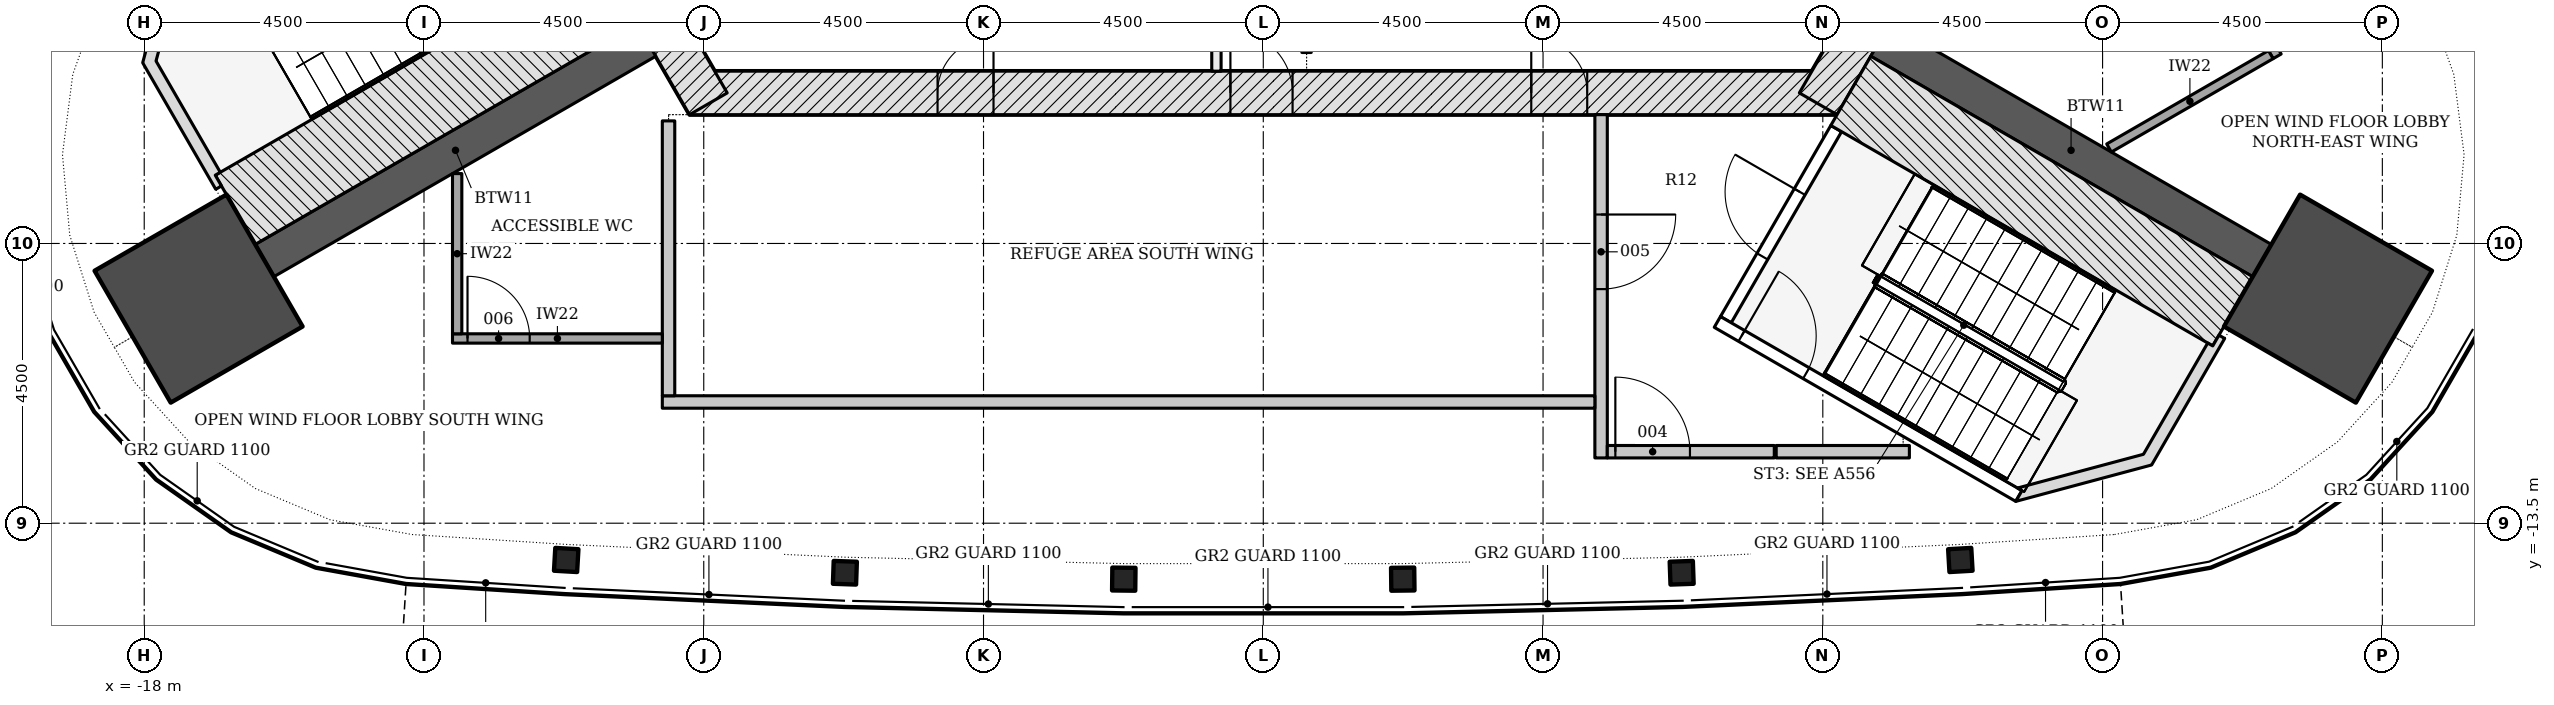
"""IFC4 building model, lengths in metres.
Left out: names, types, materials, properties, quantities, classifications, styles, units other than length and angle.
Written with IfcOpenShell. Run it as: python <this file> out.ifc"""

import sys

from ifc_helpers import new_model, si_unit, direction, frame, frame_2d, origin, origin_2d, place, context, subcontext, project, spatial, polyline, rectangle, i_section, outline, extrude, element, fill, save


model = new_model("IFC4")
c1 = context("Model", 3, precision=1e-05, world=origin(), true_north=direction((0.0, 1.0)))
c2 = subcontext(c1, "Body", "Model", "MODEL_VIEW")
j1 = project(units=[si_unit("LENGTHUNIT", "METRE"), si_unit("PLANEANGLEUNIT", "RADIAN")], contexts=[c1])
p1 = place(None, origin())
s1 = spatial("IfcSite", under=j1, at=p1, CompositionType="ELEMENT")
p2 = place(p1, origin())
s2 = spatial("IfcBuilding", under=s1, at=p2, CompositionType="ELEMENT")
p3 = place(p2, frame((0.0, 0.0, 250.8)))
s3 = spatial("IfcBuildingStorey", under=s2, at=p3, CompositionType="ELEMENT", Elevation=250.8)
p4 = place(p3, frame((-9.229, -6.578, -0.3), z_axis=(0.0, 0.0, 1.0), x_axis=(1.0, 0.0, 0.0)))
e1 = element("IfcWall", 1, at=p4, inside=s3, PredefinedType="SHEAR", context=c2, shape_type="SweptSolid", body=[
    extrude(rectangle(XDim=18.458, YDim=0.7, at=frame_2d((9.229, 0.0))), origin(), (0.0, 0.0, 1.0), 7.2),
])
p5 = place(p4, frame((8.7, 0.0, 0.3)))
e2 = element("IfcOpeningElement", 2, at=p5, cuts=e1, PredefinedType="OPENING", context=c2, shape_type="SweptSolid", body=[
    extrude(rectangle(XDim=1.0, YDim=2.1, at=frame_2d((0.5, 1.05))), frame((0.0, 0.36, 0.0), z_axis=(0.0, -1.0, 0.0), x_axis=(1.0, 0.0, 0.0)), (0.0, 0.0, 1.0), 0.72),
])
p6 = place(p4, frame((3.99, 0.0, 0.3)))
e3 = element("IfcOpeningElement", 3, at=p6, cuts=e1, PredefinedType="OPENING", context=c2, shape_type="SweptSolid", body=[
    extrude(rectangle(XDim=0.9, YDim=2.1, at=frame_2d((0.45, 1.05))), frame((0.0, 0.36, 0.0), z_axis=(0.0, -1.0, 0.0), x_axis=(1.0, 0.0, 0.0)), (0.0, 0.0, 1.0), 0.72),
])
p7 = place(p4, frame((13.539, 0.0, 0.3)))
e4 = element("IfcOpeningElement", 4, at=p7, cuts=e1, PredefinedType="OPENING", context=c2, shape_type="SweptSolid", body=[
    extrude(rectangle(XDim=0.9, YDim=2.1, at=frame_2d((0.45, 1.05))), frame((0.0, 0.36, 0.0), z_axis=(0.0, -1.0, 0.0), x_axis=(1.0, 0.0, 0.0)), (0.0, 0.0, 1.0), 0.72),
])
for number, where, z_axis, x_axis in (
    (5, (8.926, -6.753, -0.3), (0.0, 0.0, 1.0), (0.5, 0.866, 0.0)),
    (6, (-10.311, -4.353, -0.3), (0.0, 0.0, 1.0), (0.5, -0.866, 0.0)),
):
    element("IfcWall", number, at=place(p3, frame(where, z_axis=z_axis, x_axis=x_axis)), inside=s3, PredefinedType="SHEAR", context=c2, shape_type="SweptSolid", body=[
        extrude(rectangle(XDim=2.771, YDim=0.7, at=frame_2d((1.386, 0.0))), origin(), (0.0, 0.0, 1.0), 7.2),
    ])
for number, where, z_axis, x_axis in (
    (7, (-9.922, -5.728, -0.3), (0.0, 0.0, 1.0), (-0.866, -0.5, 0.0)),
    (8, (9.922, -5.728, -0.3), (0.0, 0.0, 1.0), (0.866, -0.5, 0.0)),
):
    element("IfcWall", number, at=place(p3, frame(where, z_axis=z_axis, x_axis=x_axis)), inside=s3, PredefinedType="SHEAR", context=c2, shape_type="SweptSolid", body=[
        extrude(rectangle(XDim=7.093, YDim=0.6, at=frame_2d((3.547, 0.0))), origin(), (0.0, 0.0, 1.0), 7.2),
    ])
for number, where, z_axis, x_axis in (
    (9, (-17.126, -9.887, -0.3), (0.0, 0.0, 1.0), (-0.866, -0.5, 0.0)),
    (10, (17.126, -9.887, -0.3), (0.0, 0.0, 1.0), (0.866, -0.5, 0.0)),
):
    element("IfcColumn", number, at=place(p3, frame(where, z_axis=z_axis, x_axis=x_axis)), inside=s3, PredefinedType="COLUMN", context=c2, shape_type="SweptSolid", body=[
        extrude(rectangle(XDim=2.45, YDim=2.45, at=origin_2d()), origin(), (0.0, 0.0, 1.0), 7.2),
    ])
for number, where, z_axis, x_axis in (
    (11, (-11.212, -14.092, -0.3), (0.0, 0.0, 1.0), (0.998, -0.057, 0.0)),
    (12, (-6.73, -14.297, -0.3), (0.0, 0.0, 1.0), (0.999, -0.034, 0.0)),
    (13, (-2.244, -14.4, -0.3), (0.0, 0.0, 1.0), (1.0, -0.011, 0.0)),
    (14, (2.244, -14.4, -0.3), (0.0, 0.0, 1.0), (1.0, 0.011, 0.0)),
    (15, (6.73, -14.297, -0.3), (0.0, 0.0, 1.0), (0.999, 0.034, 0.0)),
    (16, (11.212, -14.092, -0.3), (0.0, 0.0, 1.0), (0.998, 0.057, 0.0)),
):
    element("IfcColumn", number, at=place(p3, frame(where, z_axis=z_axis, x_axis=x_axis)), inside=s3, PredefinedType="COLUMN", context=c2, shape_type="SweptSolid", body=[
        extrude(i_section(OverallWidth=0.373, OverallDepth=0.368, WebThickness=0.015, FlangeThickness=0.024, FilletRadius=0.015, at=origin_2d()), origin(), (0.0, 0.0, 1.0), 7.2),
    ])
p8 = place(p3, frame((-0.754, 5.272, 0.0), z_axis=(0.0, 0.0, 1.0), x_axis=(0.0, -1.0, 0.0)))
e17 = element("IfcWall", 17, at=p8, inside=s3, PredefinedType="PARTITIONING", context=c2, shape_type="SweptSolid", body=[
    extrude(rectangle(XDim=11.5, YDim=0.15, at=frame_2d((5.75, 0.0))), origin(), (0.0, 0.0, 1.0), 6.9),
])
p9 = place(p8, frame((3.701, 0.0, 0.0)))
e18 = element("IfcOpeningElement", 18, at=p9, cuts=e17, PredefinedType="OPENING", context=c2, shape_type="SweptSolid", body=[
    extrude(rectangle(XDim=0.9, YDim=2.1, at=frame_2d((0.45, 1.05))), frame((0.0, 0.085, 0.0), z_axis=(0.0, -1.0, 0.0), x_axis=(1.0, 0.0, 0.0)), (0.0, 0.0, 1.0), 0.17),
])
p10 = place(p3, frame((0.696, -5.928, 0.0), z_axis=(0.0, 0.0, 1.0), x_axis=(0.0, 1.0, 0.0)))
e19 = element("IfcWall", 19, at=p10, inside=s3, PredefinedType="PARTITIONING", context=c2, shape_type="SweptSolid", body=[
    extrude(rectangle(XDim=11.549, YDim=0.15, at=frame_2d((5.774, 0.0))), origin(), (0.0, 0.0, 1.0), 6.9),
])
p11 = place(p10, frame((6.6, 0.0, 0.0)))
e20 = element("IfcOpeningElement", 20, at=p11, cuts=e19, PredefinedType="OPENING", context=c2, shape_type="SweptSolid", body=[
    extrude(rectangle(XDim=0.9, YDim=2.1, at=frame_2d((0.45, 1.05))), frame((0.0, 0.085, 0.0), z_axis=(0.0, -1.0, 0.0), x_axis=(1.0, 0.0, 0.0)), (0.0, 0.0, 1.0), 0.17),
])
p12 = place(p3, frame((-10.393, -4.912, -0.3), z_axis=(0.0, 0.0, 1.0), x_axis=(-0.866023389271, -0.500003489223, 0.0)))
e21 = element("IfcWall", 21, at=p12, inside=s3, PredefinedType="SHEAR", context=c2, shape_type="SweptSolid", body=[
    extrude(rectangle(XDim=7.094, YDim=1.286, at=frame_2d((3.547, 0.0))), origin(), (0.0, 0.0, 1.0), 7.2),
])
p13 = place(p3, frame((0.0, 0.0, -0.3)))
e22 = element("IfcWall", 22, at=p13, inside=s3, PredefinedType="SHEAR", context=c2, shape_type="SweptSolid", body=[
    extrude(outline(polyline([(-17.439, -3.907), (-18.025, -6.093), (-16.85, -8.128), (-16.758, -8.075), (-16.858, -7.902), (-16.858, -7.902), (-16.858, -7.902), (-16.858, -7.902), (-16.858, -7.902), (-16.858, -7.902), (-16.858, -7.902), (-16.858, -7.902), (-16.858, -7.902), (-16.858, -7.902), (-16.858, -7.902), (-16.858, -7.902), (-16.858, -7.902), (-16.858, -7.902), (-16.858, -7.902), (-16.858, -7.902), (-16.858, -7.902), (-16.777, -7.855), (-17.81, -6.065), (-17.267, -4.039), (-17.339, -4.081), (-17.339, -4.081), (-17.339, -4.081), (-17.339, -4.081), (-17.339, -4.081), (-17.339, -4.081), (-17.339, -4.081), (-17.339, -4.081), (-17.339, -4.081), (-17.339, -4.081), (-17.339, -4.081), (-17.339, -4.081), (-17.339, -4.081), (-17.339, -4.081), (-17.339, -4.081), (-17.339, -4.081), (-17.339, -4.081), (-17.439, -3.907)])), origin(), (0.0, 0.0, 1.0), 7.2),
])
p14 = place(p3, frame((7.44, -10.226, -0.3), z_axis=(0.0, 0.0, 1.0), x_axis=(0.500022077904, 0.866012656725, 0.0)))
e23 = element("IfcWall", 23, at=p14, inside=s3, PredefinedType="SHEAR", context=c2, shape_type="SweptSolid", body=[
    extrude(rectangle(XDim=3.55, YDim=0.2, at=frame_2d((1.775, 0.0))), origin(), (0.0, 0.0, 1.0), 7.2),
])
p15 = place(p14, frame((1.175, 0.0, 0.3)))
e24 = element("IfcOpeningElement", 24, at=p15, cuts=e23, PredefinedType="OPENING", context=c2, shape_type="SweptSolid", body=[
    extrude(rectangle(XDim=1.2, YDim=2.1, at=frame_2d((0.6, 1.05))), frame((0.0, 0.11, 0.0), z_axis=(0.0, -1.0, 0.0), x_axis=(1.0, 0.0, 0.0)), (0.0, 0.0, 1.0), 0.22),
])
p16 = place(p3, frame((7.304, -10.262, -0.3), z_axis=(0.0, 0.0, 1.0), x_axis=(0.866026594901, -0.49999793692, 0.0)))
e25 = element("IfcWall", 25, at=p16, inside=s3, PredefinedType="SHEAR", context=c2, shape_type="SweptSolid", body=[
    extrude(rectangle(XDim=5.6, YDim=0.2, at=frame_2d((2.8, 0.0))), origin(), (0.0, 0.0, 1.0), 7.2),
])
p17 = place(p16, frame((0.45, 0.0, 0.3)))
e26 = element("IfcOpeningElement", 26, at=p17, cuts=e25, PredefinedType="OPENING", context=c2, shape_type="SweptSolid", body=[
    extrude(rectangle(XDim=1.2, YDim=2.1, at=frame_2d((0.6, 1.05))), frame((0.0, 0.11, 0.0), z_axis=(0.0, -1.0, 0.0), x_axis=(1.0, 0.0, 0.0)), (0.0, 0.0, 1.0), 0.22),
])
p18 = place(p3, frame((9.45, -6.545, -0.3), z_axis=(0.0, 0.0, 1.0), x_axis=(0.866023389271, -0.500003489223, 0.0)))
e27 = element("IfcWall", 27, at=p18, inside=s3, PredefinedType="SHEAR", context=c2, shape_type="SweptSolid", body=[
    extrude(rectangle(XDim=7.094, YDim=1.286, at=frame_2d((3.547, 0.0))), origin(), (0.0, 0.0, 1.0), 7.2),
])
p19 = place(p3, frame((0.0, 0.0, -0.3)))
e28 = element("IfcWall", 28, at=p19, inside=s3, PredefinedType="SHEAR", context=c2, shape_type="SweptSolid", body=[
    extrude(outline(polyline([(12.104, -13.149), (14.289, -12.563), (15.464, -10.528), (15.372, -10.475), (15.272, -10.648), (15.272, -10.648), (15.272, -10.648), (15.272, -10.648), (15.272, -10.648), (15.272, -10.648), (15.272, -10.648), (15.272, -10.648), (15.272, -10.648), (15.272, -10.648), (15.272, -10.648), (15.272, -10.648), (15.272, -10.648), (15.272, -10.648), (15.272, -10.648), (15.272, -10.648), (15.272, -10.648), (15.191, -10.601), (14.157, -12.392), (12.132, -12.934), (12.204, -12.976), (12.204, -12.976), (12.204, -12.976), (12.204, -12.976), (12.204, -12.976), (12.204, -12.976), (12.204, -12.976), (12.204, -12.976), (12.204, -12.976), (12.204, -12.976), (12.204, -12.976), (12.204, -12.976), (12.204, -12.976), (12.204, -12.976), (12.204, -12.976), (12.204, -12.976), (12.204, -12.976), (12.104, -13.149)])), origin(), (0.0, 0.0, 1.0), 7.2),
])
p20 = place(p3, frame((5.434, -6.928, 0.0), z_axis=(0.0, 0.0, 1.0), x_axis=(0.0, -1.0, 0.0)))
e29 = element("IfcWall", 29, at=p20, inside=s3, PredefinedType="PARTITIONING", context=c2, shape_type="SweptSolid", body=[
    extrude(rectangle(XDim=5.522, YDim=0.2, at=frame_2d((2.761, 0.0))), origin(), (0.0, 0.0, 1.0), 6.9),
])
p21 = place(p20, frame((1.606, 0.0, 0.0)))
e30 = element("IfcOpeningElement", 30, at=p21, cuts=e29, PredefinedType="OPENING", context=c2, shape_type="SweptSolid", body=[
    extrude(rectangle(XDim=1.2, YDim=2.1, at=frame_2d((0.6, 1.05))), frame((0.0, 0.11, 0.0), z_axis=(0.0, -1.0, 0.0), x_axis=(1.0, 0.0, 0.0)), (0.0, 0.0, 1.0), 0.22),
])
p22 = place(p3, frame((-9.667, -11.55, 0.0), z_axis=(0.0, 0.0, 1.0), x_axis=(1.0, 0.0, 0.0)))
e31 = element("IfcWall", 31, at=p22, inside=s3, PredefinedType="PARTITIONING", context=c2, shape_type="SweptSolid", body=[
    extrude(rectangle(XDim=15.0, YDim=0.2, at=frame_2d((7.5, 0.0))), origin(), (0.0, 0.0, 1.0), 6.352),
])
p23 = place(p3, frame((5.534, -12.35, 0.0), z_axis=(0.0, 0.0, 1.0), x_axis=(1.0, 0.0, 0.0)))
e32 = element("IfcWall", 32, at=p23, inside=s3, PredefinedType="PARTITIONING", context=c2, shape_type="SweptSolid", body=[
    extrude(rectangle(XDim=2.686, YDim=0.2, at=frame_2d((1.343, 0.0))), origin(), (0.0, 0.0, 1.0), 6.352),
])
p24 = place(p23, frame((0.129, 0.0, 0.0)))
e33 = element("IfcOpeningElement", 33, at=p24, cuts=e32, PredefinedType="OPENING", context=c2, shape_type="SweptSolid", body=[
    extrude(rectangle(XDim=1.2, YDim=2.1, at=frame_2d((0.6, 1.05))), frame((0.0, 0.11, 0.0), z_axis=(0.0, -1.0, 0.0), x_axis=(1.0, 0.0, 0.0)), (0.0, 0.0, 1.0), 0.22),
])
p25 = place(p3, frame((8.25, -12.35, 0.0), z_axis=(0.0, 0.0, 1.0), x_axis=(1.0, 0.0, 0.0)))
e34 = element("IfcWall", 34, at=p25, inside=s3, PredefinedType="PARTITIONING", context=c2, shape_type="SweptSolid", body=[
    extrude(rectangle(XDim=2.143, YDim=0.2, at=frame_2d((1.071, 0.0))), origin(), (0.0, 0.0, 1.0), 6.9),
])
p26 = place(p3, frame((-9.566, -11.45, 0.0), z_axis=(0.0, 0.0, 1.0), x_axis=(0.0, 1.0, 0.0)))
e35 = element("IfcWall", 35, at=p26, inside=s3, PredefinedType="PARTITIONING", context=c2, shape_type="SweptSolid", body=[
    extrude(rectangle(XDim=4.422, YDim=0.2, at=frame_2d((2.211, 0.0))), origin(), (0.0, 0.0, 1.0), 6.9),
])
p27 = place(p3, frame((-13.042, -10.528, 0.0), z_axis=(0.0, 0.0, 1.0), x_axis=(1.0, 0.0, 0.0)))
e36 = element("IfcWall", 36, at=p27, inside=s3, PredefinedType="PARTITIONING", context=c2, shape_type="SweptSolid", body=[
    extrude(rectangle(XDim=3.375, YDim=0.15, at=frame_2d((1.688, 0.0))), origin(), (0.0, 0.0, 1.0), 6.352),
])
p28 = place(p27, frame((0.241, 0.0, 0.0)))
e37 = element("IfcOpeningElement", 37, at=p28, cuts=e36, PredefinedType="OPENING", context=c2, shape_type="SweptSolid", body=[
    extrude(rectangle(XDim=1.0, YDim=2.1, at=frame_2d((0.5, 1.05))), frame((0.0, 0.085, 0.0), z_axis=(0.0, -1.0, 0.0), x_axis=(1.0, 0.0, 0.0)), (0.0, 0.0, 1.0), 0.17),
])
p29 = place(p3, frame((13.72, -1.508, 0.0), z_axis=(0.0, 0.0, 1.0), x_axis=(0.500020560727, -0.866013532718, 0.0)))
e38 = element("IfcWall", 38, at=p29, inside=s3, PredefinedType="PARTITIONING", context=c2, shape_type="SweptSolid", body=[
    extrude(rectangle(XDim=5.175, YDim=0.15, at=frame_2d((2.587, 0.0))), origin(), (0.0, 0.0, 1.0), 6.352),
])
p30 = place(p29, frame((2.469, 0.0, 0.0)))
e39 = element("IfcOpeningElement", 39, at=p30, cuts=e38, PredefinedType="OPENING", context=c2, shape_type="SweptSolid", body=[
    extrude(rectangle(XDim=1.0, YDim=2.1, at=frame_2d((0.5, 1.05))), frame((0.0, 0.085, 0.0), z_axis=(0.0, -1.0, 0.0), x_axis=(1.0, 0.0, 0.0)), (0.0, 0.0, 1.0), 0.17),
])
p31 = place(p3, frame((-12.966, -7.876, 0.0), z_axis=(0.0, 0.0, 1.0), x_axis=(0.0, -1.0, 0.0)))
e40 = element("IfcWall", 40, at=p31, inside=s3, PredefinedType="PARTITIONING", context=c2, shape_type="SweptSolid", body=[
    extrude(rectangle(XDim=2.577, YDim=0.15, at=frame_2d((1.289, 0.0))), origin(), (0.0, 0.0, 1.0), 6.9),
])
p32 = place(p3, frame((13.604, -7.465, 0.0), z_axis=(0.0, 0.0, 1.0), x_axis=(0.865998815133, 0.500046050067, 0.0)))
e41 = element("IfcWall", 41, at=p32, inside=s3, PredefinedType="PARTITIONING", context=c2, shape_type="SweptSolid", body=[
    extrude(rectangle(XDim=3.004, YDim=0.15, at=frame_2d((1.502, 0.0))), origin(), (0.0, 0.0, 1.0), 6.9),
])
p33 = place(p5, origin())
e42 = element("IfcDoor", 42, at=p33, inside=s3, OperationType="SINGLE_SWING_LEFT", PredefinedType="DOOR", context=c2, shape_type="SweptSolid", body=[
    extrude(rectangle(XDim=1.0, YDim=2.1, at=frame_2d((0.5, 1.05))), frame((0.0, 0.075, 0.0), z_axis=(0.0, -1.0, 0.0), x_axis=(1.0, 0.0, 0.0)), (0.0, 0.0, 1.0), 0.15),
])
fill(e2, e42)
p34 = place(p6, origin())
e43 = element("IfcDoor", 43, at=p34, inside=s3, OperationType="SINGLE_SWING_RIGHT", PredefinedType="DOOR", context=c2, shape_type="SweptSolid", body=[
    extrude(rectangle(XDim=0.9, YDim=2.1, at=frame_2d((0.45, 1.05))), frame((0.0, 0.075, 0.0), z_axis=(0.0, -1.0, 0.0), x_axis=(1.0, 0.0, 0.0)), (0.0, 0.0, 1.0), 0.15),
])
fill(e3, e43)
p35 = place(p7, origin())
e44 = element("IfcDoor", 44, at=p35, inside=s3, OperationType="SINGLE_SWING_LEFT", PredefinedType="DOOR", context=c2, shape_type="SweptSolid", body=[
    extrude(rectangle(XDim=0.9, YDim=2.1, at=frame_2d((0.45, 1.05))), frame((0.0, 0.075, 0.0), z_axis=(0.0, -1.0, 0.0), x_axis=(1.0, 0.0, 0.0)), (0.0, 0.0, 1.0), 0.15),
])
fill(e4, e44)
p36 = place(p15, origin())
e45 = element("IfcDoor", 45, at=p36, inside=s3, OperationType="SINGLE_SWING_RIGHT", PredefinedType="DOOR", context=c2, shape_type="SweptSolid", body=[
    extrude(rectangle(XDim=1.2, YDim=2.1, at=frame_2d((0.6, 1.05))), frame((0.0, 0.025, 0.0), z_axis=(0.0, -1.0, 0.0), x_axis=(1.0, 0.0, 0.0)), (0.0, 0.0, 1.0), 0.05),
])
fill(e24, e45)
p37 = place(p17, origin())
e46 = element("IfcDoor", 46, at=p37, inside=s3, OperationType="SINGLE_SWING_LEFT", PredefinedType="DOOR", context=c2, shape_type="SweptSolid", body=[
    extrude(rectangle(XDim=1.2, YDim=2.1, at=frame_2d((0.6, 1.05))), frame((0.0, 0.025, 0.0), z_axis=(0.0, -1.0, 0.0), x_axis=(1.0, 0.0, 0.0)), (0.0, 0.0, 1.0), 0.05),
])
fill(e26, e46)
p38 = place(p24, origin())
e47 = element("IfcDoor", 47, at=p38, inside=s3, OperationType="SINGLE_SWING_LEFT", PredefinedType="DOOR", context=c2, shape_type="SweptSolid", body=[
    extrude(rectangle(XDim=1.2, YDim=2.1, at=frame_2d((0.6, 1.05))), frame((0.0, 0.025, 0.0), z_axis=(0.0, -1.0, 0.0), x_axis=(1.0, 0.0, 0.0)), (0.0, 0.0, 1.0), 0.05),
])
fill(e33, e47)
p39 = place(p21, origin())
e48 = element("IfcDoor", 48, at=p39, inside=s3, OperationType="SINGLE_SWING_LEFT", PredefinedType="DOOR", context=c2, shape_type="SweptSolid", body=[
    extrude(rectangle(XDim=1.2, YDim=2.1, at=frame_2d((0.6, 1.05))), frame((0.0, 0.025, 0.0), z_axis=(0.0, -1.0, 0.0), x_axis=(1.0, 0.0, 0.0)), (0.0, 0.0, 1.0), 0.05),
])
fill(e30, e48)
p40 = place(p28, origin())
e49 = element("IfcDoor", 49, at=p40, inside=s3, OperationType="SINGLE_SWING_LEFT", PredefinedType="DOOR", context=c2, shape_type="SweptSolid", body=[
    extrude(rectangle(XDim=1.0, YDim=2.1, at=frame_2d((0.5, 1.05))), frame((0.0, 0.025, 0.0), z_axis=(0.0, -1.0, 0.0), x_axis=(1.0, 0.0, 0.0)), (0.0, 0.0, 1.0), 0.05),
])
fill(e37, e49)
save(model, sys.argv[1])
